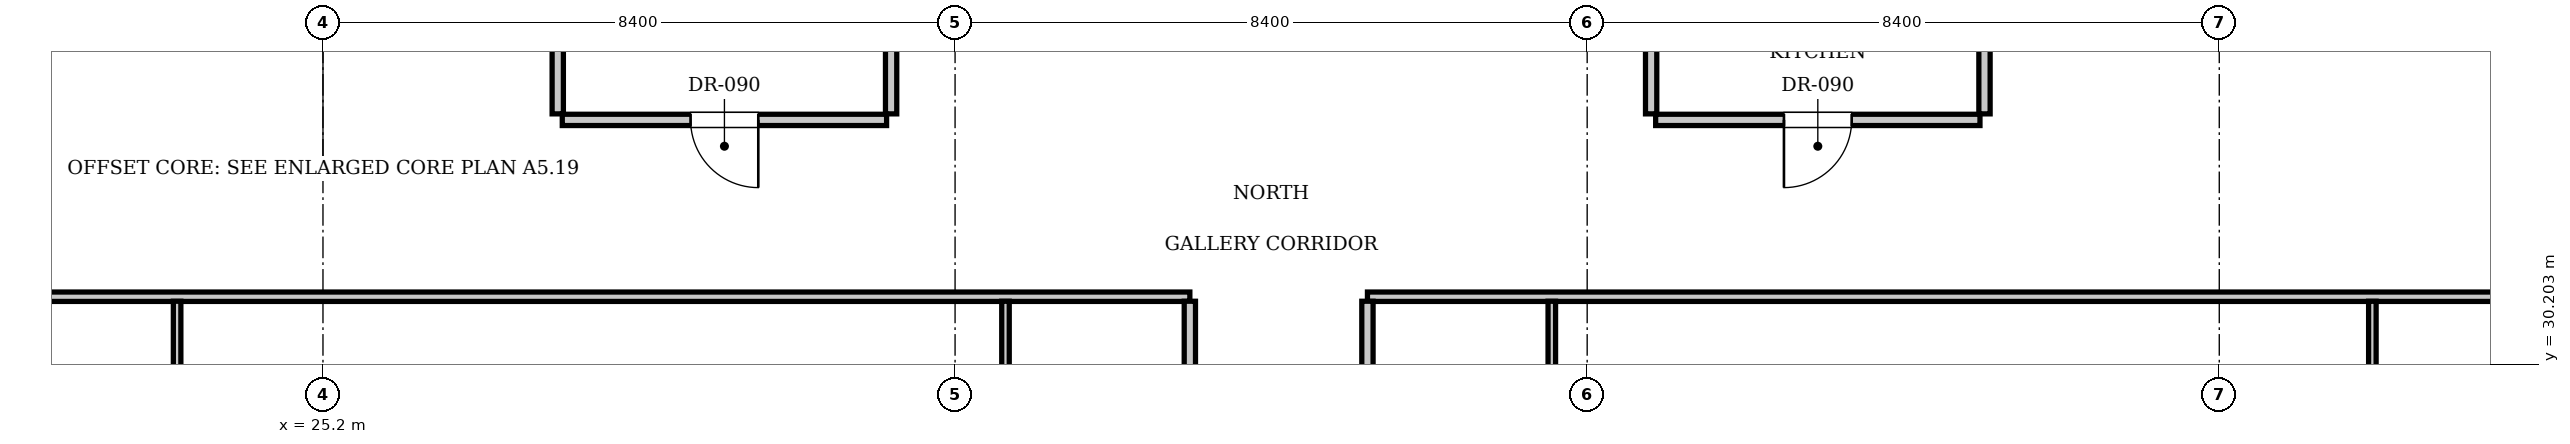
"""IFC4 building model, lengths in metres.
Left out: names, types, materials, properties, quantities, classifications, styles, units other than length and angle.
Written with IfcOpenShell. Run it as: python <this file> out.ifc"""

import sys

from ifc_helpers import new_model, si_unit, direction, frame, frame_2d, origin, place, context, subcontext, project, spatial, rectangle, extrude, element, fill, save


model = new_model("IFC4")
c1 = context("Model", 3, precision=1e-05, world=origin(), true_north=direction((0.0, 1.0)))
c2 = subcontext(c1, "Body", "Model", "MODEL_VIEW")
j1 = project(units=[si_unit("LENGTHUNIT", "METRE"), si_unit("PLANEANGLEUNIT", "RADIAN")], contexts=[c1])
p1 = place(None, origin())
s1 = spatial("IfcSite", under=j1, at=p1, CompositionType="ELEMENT")
p2 = place(p1, origin())
s2 = spatial("IfcBuilding", under=s1, at=p2, CompositionType="ELEMENT")
p3 = place(p2, frame((0.0, 0.0, 215.95)))
s3 = spatial("IfcBuildingStorey", under=s2, at=p3, CompositionType="ELEMENT", Elevation=215.95)
for number, where, z_axis, x_axis in (
    (1, (28.32, 33.53, 0.0), (0.0, 0.0, 1.0), (0.0, 1.0, 0.0)),
    (2, (32.75, 33.53, 0.0), (0.0, 0.0, 1.0), (0.0, 1.0, 0.0)),
):
    element("IfcWall", number, at=place(p3, frame(where, z_axis=z_axis, x_axis=x_axis)), inside=s3, PredefinedType="PARTITIONING", context=c2, shape_type="SweptSolid", body=[
        extrude(rectangle(XDim=2.59, YDim=0.15, at=frame_2d((1.295, 0.0))), origin(), (0.0, 0.0, 1.0), 3.61),
    ])
p4 = place(p3, frame((28.38, 33.45, 0.0), z_axis=(0.0, 0.0, 1.0), x_axis=(1.0, 0.0, 0.0)))
e3 = element("IfcWall", 3, at=p4, inside=s3, PredefinedType="PARTITIONING", context=c2, shape_type="SweptSolid", body=[
    extrude(rectangle(XDim=4.31, YDim=0.15, at=frame_2d((2.155, 0.0))), origin(), (0.0, 0.0, 1.0), 3.61),
])
p5 = place(p4, frame((1.705, 0.0, 0.0)))
e4 = element("IfcOpeningElement", 4, at=p5, cuts=e3, PredefinedType="OPENING", context=c2, shape_type="SweptSolid", body=[
    extrude(rectangle(XDim=0.9, YDim=2.1, at=frame_2d((0.45, 1.05))), frame((0.0, 0.085, 0.0), z_axis=(0.0, -1.0, 0.0), x_axis=(1.0, 0.0, 0.0)), (0.0, 0.0, 1.0), 0.17),
])
for number, where, z_axis, x_axis in (
    (5, (42.85, 33.53, 0.0), (0.0, 0.0, 1.0), (0.0, 1.0, 0.0)),
    (6, (47.28, 33.53, 0.0), (0.0, 0.0, 1.0), (0.0, 1.0, 0.0)),
):
    element("IfcWall", number, at=place(p3, frame(where, z_axis=z_axis, x_axis=x_axis)), inside=s3, PredefinedType="PARTITIONING", context=c2, shape_type="SweptSolid", body=[
        extrude(rectangle(XDim=2.59, YDim=0.15, at=frame_2d((1.295, 0.0))), origin(), (0.0, 0.0, 1.0), 3.61),
    ])
p6 = place(p3, frame((42.91, 33.45, 0.0), z_axis=(0.0, 0.0, 1.0), x_axis=(1.0, 0.0, 0.0)))
e7 = element("IfcWall", 7, at=p6, inside=s3, PredefinedType="PARTITIONING", context=c2, shape_type="SweptSolid", body=[
    extrude(rectangle(XDim=4.31, YDim=0.15, at=frame_2d((2.155, 0.0))), origin(), (0.0, 0.0, 1.0), 3.61),
])
p7 = place(p6, frame((1.705, 0.0, 0.0)))
e8 = element("IfcOpeningElement", 8, at=p7, cuts=e7, PredefinedType="OPENING", context=c2, shape_type="SweptSolid", body=[
    extrude(rectangle(XDim=0.9, YDim=2.1, at=frame_2d((0.45, 1.05))), frame((0.0, 0.085, 0.0), z_axis=(0.0, -1.0, 0.0), x_axis=(1.0, 0.0, 0.0)), (0.0, 0.0, 1.0), 0.17),
])
p8 = place(p3, frame((13.2, 31.1, 0.0), z_axis=(0.0, 0.0, 1.0), x_axis=(1.0, 0.0, 0.0)))
e9 = element("IfcWall", 9, at=p8, inside=s3, PredefinedType="PARTITIONING", context=c2, shape_type="SweptSolid", body=[
    extrude(rectangle(XDim=23.52, YDim=0.125, at=frame_2d((11.76, 0.0))), origin(), (0.0, 0.0, 1.0), 3.61),
])
p9 = place(p3, frame((39.08, 31.1, 0.0), z_axis=(0.0, 0.0, 1.0), x_axis=(1.0, 0.0, 0.0)))
e10 = element("IfcWall", 10, at=p9, inside=s3, PredefinedType="PARTITIONING", context=c2, shape_type="SweptSolid", body=[
    extrude(rectangle(XDim=23.32, YDim=0.125, at=frame_2d((11.66, 0.0))), origin(), (0.0, 0.0, 1.0), 3.61),
])
p10 = place(p3, frame((36.72, 29.15, 0.0), z_axis=(0.0, 0.0, 1.0), x_axis=(0.0, 1.0, 0.0)))
e11 = element("IfcWall", 11, at=p10, inside=s3, PredefinedType="PARTITIONING", context=c2, shape_type="SweptSolid", body=[
    extrude(rectangle(XDim=1.89, YDim=0.15, at=frame_2d((0.945, 0.0))), origin(), (0.0, 0.0, 1.0), 3.61),
])
p11 = place(p3, frame((34.27, 29.15, 0.0), z_axis=(0.0, 0.0, 1.0), x_axis=(0.0, 1.0, 0.0)))
e12 = element("IfcWall", 12, at=p11, inside=s3, PredefinedType="PARTITIONING", context=c2, shape_type="SweptSolid", body=[
    extrude(rectangle(XDim=1.89, YDim=0.1, at=frame_2d((0.945, 0.0))), origin(), (0.0, 0.0, 1.0), 3.61),
])
p12 = place(p3, frame((23.262, 26.76, 0.0), z_axis=(0.0, 0.0, 1.0), x_axis=(0.0, 1.0, 0.0)))
e13 = element("IfcWall", 13, at=p12, inside=s3, PredefinedType="PARTITIONING", context=c2, shape_type="SweptSolid", body=[
    extrude(rectangle(XDim=4.28, YDim=0.1, at=frame_2d((2.14, 0.0))), origin(), (0.0, 0.0, 1.0), 3.61),
])
p13 = place(p12, frame((1.69, 0.0, 0.0)))
e14 = element("IfcOpeningElement", 14, at=p13, cuts=e13, PredefinedType="OPENING", context=c2, shape_type="SweptSolid", body=[
    extrude(rectangle(XDim=0.9, YDim=2.1, at=frame_2d((0.45, 1.05))), frame((0.0, 0.06, 0.0), z_axis=(0.0, -1.0, 0.0), x_axis=(1.0, 0.0, 0.0)), (0.0, 0.0, 1.0), 0.12),
])
p14 = place(p3, frame((39.08, 29.15, 0.0), z_axis=(0.0, 0.0, 1.0), x_axis=(0.0, 1.0, 0.0)))
e15 = element("IfcWall", 15, at=p14, inside=s3, PredefinedType="PARTITIONING", context=c2, shape_type="SweptSolid", body=[
    extrude(rectangle(XDim=1.89, YDim=0.15, at=frame_2d((0.945, 0.0))), origin(), (0.0, 0.0, 1.0), 3.61),
])
p15 = place(p3, frame((41.53, 29.15, 0.0), z_axis=(0.0, 0.0, 1.0), x_axis=(0.0, 1.0, 0.0)))
e16 = element("IfcWall", 16, at=p15, inside=s3, PredefinedType="PARTITIONING", context=c2, shape_type="SweptSolid", body=[
    extrude(rectangle(XDim=1.89, YDim=0.1, at=frame_2d((0.945, 0.0))), origin(), (0.0, 0.0, 1.0), 3.61),
])
p16 = place(p3, frame((52.434, 26.76, 0.0), z_axis=(0.0, 0.0, 1.0), x_axis=(0.0, 1.0, 0.0)))
e17 = element("IfcWall", 17, at=p16, inside=s3, PredefinedType="PARTITIONING", context=c2, shape_type="SweptSolid", body=[
    extrude(rectangle(XDim=4.28, YDim=0.1, at=frame_2d((2.14, 0.0))), origin(), (0.0, 0.0, 1.0), 3.61),
])
p17 = place(p16, frame((1.69, 0.0, 0.0)))
e18 = element("IfcOpeningElement", 18, at=p17, cuts=e17, PredefinedType="OPENING", context=c2, shape_type="SweptSolid", body=[
    extrude(rectangle(XDim=0.9, YDim=2.1, at=frame_2d((0.45, 1.05))), frame((0.0, 0.06, 0.0), z_axis=(0.0, -1.0, 0.0), x_axis=(1.0, 0.0, 0.0)), (0.0, 0.0, 1.0), 0.12),
])
p18 = place(p5, frame((0.9, 0.0, 0.0), z_axis=(0.0, 0.0, 1.0), x_axis=(-1.0, 0.0, 0.0)))
e19 = element("IfcDoor", 19, at=p18, inside=s3, OperationType="SINGLE_SWING_LEFT", PredefinedType="DOOR", context=c2, shape_type="SweptSolid", body=[
    extrude(rectangle(XDim=0.9, YDim=2.1, at=frame_2d((0.45, 1.05))), frame((0.0, 0.025, 0.0), z_axis=(0.0, -1.0, 0.0), x_axis=(1.0, 0.0, 0.0)), (0.0, 0.0, 1.0), 0.05),
])
fill(e4, e19)
p19 = place(p7, frame((0.9, 0.0, 0.0), z_axis=(0.0, 0.0, 1.0), x_axis=(-1.0, 0.0, 0.0)))
e20 = element("IfcDoor", 20, at=p19, inside=s3, OperationType="SINGLE_SWING_RIGHT", PredefinedType="DOOR", context=c2, shape_type="SweptSolid", body=[
    extrude(rectangle(XDim=0.9, YDim=2.1, at=frame_2d((0.45, 1.05))), frame((0.0, 0.025, 0.0), z_axis=(0.0, -1.0, 0.0), x_axis=(1.0, 0.0, 0.0)), (0.0, 0.0, 1.0), 0.05),
])
fill(e8, e20)
save(model, sys.argv[1])
